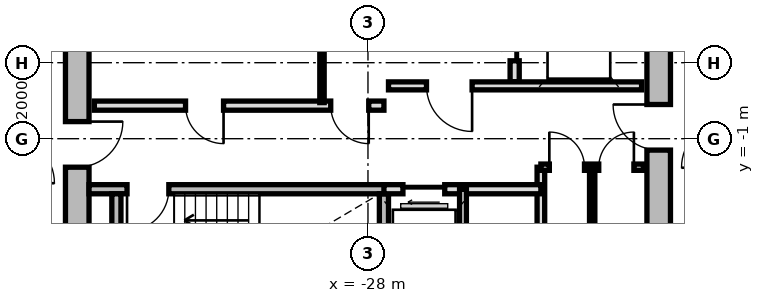
"""IFC4 building model, lengths in metres.
Left out: names, types, materials, properties, quantities, classifications, styles, units other than length and angle.
Written with IfcOpenShell. Run it as: python <this file> out.ifc"""

import sys

from ifc_helpers import new_model, si_unit, direction, frame, frame_2d, origin, place, context, subcontext, project, spatial, rectangle, extrude, source, transform, mapped, element, fill, save


model = new_model("IFC4")
c1 = context("Model", 3, precision=1e-05, world=origin(), true_north=direction((0.0, 1.0)))
c2 = subcontext(c1, "Body", "Model", "MODEL_VIEW")
j1 = project(units=[si_unit("LENGTHUNIT", "METRE"), si_unit("PLANEANGLEUNIT", "RADIAN")], contexts=[c1])
p1 = place(None, origin())
s1 = spatial("IfcSite", under=j1, at=p1, CompositionType="ELEMENT")
p2 = place(p1, origin())
s2 = spatial("IfcBuilding", under=s1, at=p2, CompositionType="ELEMENT")
p3 = place(p2, frame((0.0, 0.0, 146.5)))
s3 = spatial("IfcBuildingStorey", under=s2, at=p3, CompositionType="ELEMENT", Elevation=146.5)
m1 = source(origin(), c2, "Body", "SweptSolid", [
    extrude(rectangle(XDim=11.1, YDim=0.62, at=frame_2d((5.55, 0.0))), origin(), (0.0, 0.0, 1.0), 2.81),
])
p4 = place(p3, frame((-35.65, -5.55, 0.0), z_axis=(0.0, 0.0, 1.0), x_axis=(0.0, 1.0, 0.0)))
e1 = element("IfcWall", 1, at=p4, inside=s3, PredefinedType="SHEAR", context=c2, shape_type="MappedRepresentation", body=[
    mapped(m1, transform((0.0, 0.0, 0.0), x_axis=(1.0, 0.0, 0.0), y_axis=(0.0, 1.0, 0.0), z_axis=(0.0, 0.0, 1.0), scale=1.0)),
])
p5 = place(p4, frame((3.8, 0.0, 0.0)))
e2 = element("IfcOpeningElement", 2, at=p5, cuts=e1, PredefinedType="OPENING", context=c2, shape_type="SweptSolid", body=[
    extrude(rectangle(XDim=1.2, YDim=2.15, at=frame_2d((0.6, 1.075))), frame((0.0, 0.32, 0.0), z_axis=(0.0, -1.0, 0.0), x_axis=(1.0, 0.0, 0.0)), (0.0, 0.0, 1.0), 0.64),
])
p6 = place(p3, frame((-20.35, 5.55, 0.0), z_axis=(0.0, 0.0, 1.0), x_axis=(0.0, -1.0, 0.0)))
e3 = element("IfcWall", 3, at=p6, inside=s3, PredefinedType="SHEAR", context=c2, shape_type="MappedRepresentation", body=[
    mapped(m1, transform((0.0, 0.0, 0.0), x_axis=(1.0, 0.0, 0.0), y_axis=(0.0, 1.0, 0.0), z_axis=(0.0, 0.0, 1.0), scale=1.0)),
])
p7 = place(p6, frame((5.65, 0.0, 0.0)))
e4 = element("IfcOpeningElement", 4, at=p7, cuts=e3, PredefinedType="OPENING", context=c2, shape_type="SweptSolid", body=[
    extrude(rectangle(XDim=1.2, YDim=2.15, at=frame_2d((0.6, 1.075))), frame((0.0, 0.32, 0.0), z_axis=(0.0, -1.0, 0.0), x_axis=(1.0, 0.0, 0.0)), (0.0, 0.0, 1.0), 0.64),
])
m2 = source(origin(), c2, "Body", "SweptSolid", [
    extrude(rectangle(XDim=7.88, YDim=0.24, at=frame_2d((3.94, 0.0))), origin(), (0.0, 0.0, 1.0), 2.81),
])
p8 = place(p3, frame((-35.34, -2.33, 0.0), z_axis=(0.0, 0.0, 1.0), x_axis=(1.0, 0.0, 0.0)))
e5 = element("IfcWall", 5, at=p8, inside=s3, PredefinedType="PARTITIONING", context=c2, shape_type="MappedRepresentation", body=[
    mapped(m2, transform((0.0, 0.0, 0.0), x_axis=(1.0, 0.0, 0.0), y_axis=(0.0, 1.0, 0.0), z_axis=(0.0, 0.0, 1.0), scale=1.0)),
])
p9 = place(p8, frame((1.0, 0.0, 0.0)))
e6 = element("IfcOpeningElement", 6, at=p9, cuts=e5, PredefinedType="OPENING", context=c2, shape_type="SweptSolid", body=[
    extrude(rectangle(XDim=1.1, YDim=2.15, at=frame_2d((0.55, 1.075))), frame((0.0, 0.13, 0.0), z_axis=(0.0, -1.0, 0.0), x_axis=(1.0, 0.0, 0.0)), (0.0, 0.0, 1.0), 0.26),
])
m3 = source(origin(), c2, "Body", "SweptSolid", [
    extrude(rectangle(XDim=3.19, YDim=0.24, at=frame_2d((1.595, 0.0))), origin(), (0.0, 0.0, 1.0), 2.81),
])
for number, where, z_axis, x_axis in (
    (7, (-34.62, -5.64, 0.0), (0.0, 0.0, 1.0), (0.0, 1.0, 0.0)),
    (8, (-27.58, -5.64, 0.0), (0.0, 0.0, 1.0), (0.0, 1.0, 0.0)),
):
    element("IfcWall", number, at=place(p3, frame(where, z_axis=z_axis, x_axis=x_axis)), inside=s3, PredefinedType="PARTITIONING", context=c2, shape_type="MappedRepresentation", body=[
        mapped(m3, transform((0.0, 0.0, 0.0), x_axis=(1.0, 0.0, 0.0), y_axis=(0.0, 1.0, 0.0), z_axis=(0.0, 0.0, 1.0), scale=1.0)),
    ])
m4 = source(origin(), c2, "Body", "SweptSolid", [
    extrude(rectangle(XDim=5.0, YDim=0.24, at=frame_2d((2.5, 0.0))), origin(), (0.0, 0.0, 1.0), 2.795),
])
p10 = place(p3, frame((-24.14, 0.5, 0.0), z_axis=(0.0, 0.0, 1.0), x_axis=(0.0, 1.0, 0.0)))
e9 = element("IfcWall", 9, at=p10, inside=s3, PredefinedType="PARTITIONING", context=c2, shape_type="MappedRepresentation", body=[
    mapped(m4, transform((0.0, 0.0, 0.0), x_axis=(1.0, 0.0, 0.0), y_axis=(0.0, 1.0, 0.0), z_axis=(0.0, 0.0, 1.0), scale=1.0)),
])
p11 = place(p10, frame((3.05, 0.0, 0.0)))
e10 = element("IfcOpeningElement", 10, at=p11, cuts=e9, PredefinedType="OPENING", context=c2, shape_type="SweptSolid", body=[
    extrude(rectangle(XDim=1.3, YDim=2.2, at=frame_2d((0.65, 1.1))), frame((0.0, 0.13, 0.0), z_axis=(0.0, -1.0, 0.0), x_axis=(1.0, 0.0, 0.0)), (0.0, 0.0, 1.0), 0.26),
])
p12 = place(p10, frame((0.55, 0.0, 0.0)))
e11 = element("IfcOpeningElement", 11, at=p12, cuts=e9, PredefinedType="OPENING", context=c2, shape_type="SweptSolid", body=[
    extrude(rectangle(XDim=1.3, YDim=2.2, at=frame_2d((0.65, 1.1))), frame((0.0, 0.13, 0.0), z_axis=(0.0, -1.0, 0.0), x_axis=(1.0, 0.0, 0.0)), (0.0, 0.0, 1.0), 0.26),
])
m5 = source(origin(), c2, "Body", "SweptSolid", [
    extrude(rectangle(XDim=6.66, YDim=0.21, at=frame_2d((3.33, 0.0))), origin(), (0.0, 0.0, 1.0), 2.795),
])
p13 = place(p3, frame((-27.46, 0.39, 0.0), z_axis=(0.0, 0.0, 1.0), x_axis=(1.0, 0.0, 0.0)))
e12 = element("IfcWall", 12, at=p13, inside=s3, PredefinedType="PARTITIONING", context=c2, shape_type="MappedRepresentation", body=[
    mapped(m5, transform((0.0, 0.0, 0.0), x_axis=(1.0, 0.0, 0.0), y_axis=(0.0, 1.0, 0.0), z_axis=(0.0, 0.0, 1.0), scale=1.0)),
])
p14 = place(p13, frame((1.0, 0.0, 0.0)))
e13 = element("IfcOpeningElement", 13, at=p14, cuts=e12, PredefinedType="OPENING", context=c2, shape_type="SweptSolid", body=[
    extrude(rectangle(XDim=1.2, YDim=2.15, at=frame_2d((0.6, 1.075))), frame((0.0, 0.115, 0.0), z_axis=(0.0, -1.0, 0.0), x_axis=(1.0, 0.0, 0.0)), (0.0, 0.0, 1.0), 0.23),
])
m6 = source(origin(), c2, "Body", "SweptSolid", [
    extrude(rectangle(XDim=7.62, YDim=0.24, at=frame_2d((3.81, 0.0))), origin(), (0.0, 0.0, 1.0), 2.795),
])
p15 = place(p3, frame((-35.2, -0.13, 0.0), z_axis=(0.0, 0.0, 1.0), x_axis=(1.0, 0.0, 0.0)))
e14 = element("IfcWall", 14, at=p15, inside=s3, PredefinedType="PARTITIONING", context=c2, shape_type="MappedRepresentation", body=[
    mapped(m6, transform((0.0, 0.0, 0.0), x_axis=(1.0, 0.0, 0.0), y_axis=(0.0, 1.0, 0.0), z_axis=(0.0, 0.0, 1.0), scale=1.0)),
])
p16 = place(p15, frame((6.22, 0.0, 0.0)))
e15 = element("IfcOpeningElement", 15, at=p16, cuts=e14, PredefinedType="OPENING", context=c2, shape_type="SweptSolid", body=[
    extrude(rectangle(XDim=1.0, YDim=2.1, at=frame_2d((0.5, 1.05))), frame((0.0, 0.13, 0.0), z_axis=(0.0, -1.0, 0.0), x_axis=(1.0, 0.0, 0.0)), (0.0, 0.0, 1.0), 0.26),
])
p17 = place(p15, frame((2.4, 0.0, 0.0)))
e16 = element("IfcOpeningElement", 16, at=p17, cuts=e14, PredefinedType="OPENING", context=c2, shape_type="SweptSolid", body=[
    extrude(rectangle(XDim=1.0, YDim=2.1, at=frame_2d((0.5, 1.05))), frame((0.0, 0.13, 0.0), z_axis=(0.0, -1.0, 0.0), x_axis=(1.0, 0.0, 0.0)), (0.0, 0.0, 1.0), 0.26),
])
m7 = source(origin(), c2, "Body", "SweptSolid", [
    extrude(rectangle(XDim=2.33, YDim=0.115, at=frame_2d((1.165, 0.0))), origin(), (0.0, 0.0, 1.0), 2.795),
])
p18 = place(p3, frame((-29.21, -0.05, 0.0), z_axis=(0.0, 0.0, 1.0), x_axis=(0.0, 1.0, 0.0)))
e17 = element("IfcWall", 17, at=p18, inside=s3, PredefinedType="PARTITIONING", context=c2, shape_type="MappedRepresentation", body=[
    mapped(m7, transform((0.0, 0.0, 0.0), x_axis=(1.0, 0.0, 0.0), y_axis=(0.0, 1.0, 0.0), z_axis=(0.0, 0.0, 1.0), scale=1.0)),
])
m8 = source(origin(), c2, "Body", "SweptSolid", [
    extrude(rectangle(XDim=3.8, YDim=0.2, at=frame_2d((1.9, 0.0))), origin(), (0.0, 0.0, 1.0), 2.795),
])
p19 = place(p3, frame((-23.45, -5.55, 0.0), z_axis=(0.0, 0.0, 1.0), x_axis=(0.0, 1.0, 0.0)))
e18 = element("IfcWall", 18, at=p19, inside=s3, PredefinedType="PARTITIONING", context=c2, shape_type="MappedRepresentation", body=[
    mapped(m8, transform((0.0, 0.0, 0.0), x_axis=(1.0, 0.0, 0.0), y_axis=(0.0, 1.0, 0.0), z_axis=(0.0, 0.0, 1.0), scale=1.0)),
])
m9 = source(origin(), c2, "Body", "SweptSolid", [
    extrude(rectangle(XDim=4.13, YDim=0.24, at=frame_2d((2.065, 0.0))), origin(), (0.0, 0.0, 1.0), 2.795),
])
p20 = place(p3, frame((-27.58, -2.33, 0.0), z_axis=(0.0, 0.0, 1.0), x_axis=(1.0, 0.0, 0.0)))
e19 = element("IfcWall", 19, at=p20, inside=s3, PredefinedType="PARTITIONING", context=c2, shape_type="MappedRepresentation", body=[
    mapped(m9, transform((0.0, 0.0, 0.0), x_axis=(1.0, 0.0, 0.0), y_axis=(0.0, 1.0, 0.0), z_axis=(0.0, 0.0, 1.0), scale=1.0)),
])
p21 = place(p20, frame((0.5, 0.0, 0.0)))
e20 = element("IfcOpeningElement", 20, at=p21, cuts=e19, PredefinedType="OPENING", context=c2, shape_type="SweptSolid", body=[
    extrude(rectangle(XDim=1.1, YDim=2.2, at=frame_2d((0.55, 1.1))), frame((0.0, 0.13, 0.0), z_axis=(0.0, -1.0, 0.0), x_axis=(1.0, 0.0, 0.0)), (0.0, 0.0, 1.0), 0.26),
])
m10 = source(origin(), c2, "Body", "SweptSolid", [
    extrude(rectangle(XDim=3.22, YDim=0.18, at=frame_2d((1.61, 0.0))), origin(), (0.0, 0.0, 1.0), 2.795),
])
p22 = place(p3, frame((-25.5, -5.55, 0.0), z_axis=(0.0, 0.0, 1.0), x_axis=(0.0, 1.0, 0.0)))
e21 = element("IfcWall", 21, at=p22, inside=s3, PredefinedType="PARTITIONING", context=c2, shape_type="MappedRepresentation", body=[
    mapped(m10, transform((0.0, 0.0, 0.0), x_axis=(1.0, 0.0, 0.0), y_axis=(0.0, 1.0, 0.0), z_axis=(0.0, 0.0, 1.0), scale=1.0)),
])
m11 = source(origin(), c2, "Body", "SweptSolid", [
    extrude(rectangle(XDim=2.7, YDim=0.165, at=frame_2d((1.35, 0.0))), origin(), (0.0, 0.0, 1.0), 2.795),
])
p23 = place(p3, frame((-23.45, -1.75, 0.0), z_axis=(0.0, 0.0, 1.0), x_axis=(1.0, 0.0, 0.0)))
e22 = element("IfcWall", 22, at=p23, inside=s3, PredefinedType="PARTITIONING", context=c2, shape_type="MappedRepresentation", body=[
    mapped(m11, transform((0.0, 0.0, 0.0), x_axis=(1.0, 0.0, 0.0), y_axis=(0.0, 1.0, 0.0), z_axis=(0.0, 0.0, 1.0), scale=1.0)),
])
p24 = place(p23, frame((0.222, 0.0, 0.0)))
e23 = element("IfcOpeningElement", 23, at=p24, cuts=e22, PredefinedType="OPENING", context=c2, shape_type="SweptSolid", body=[
    extrude(rectangle(XDim=0.925, YDim=2.1, at=frame_2d((0.462, 1.05))), frame((0.0, 0.093, 0.0), z_axis=(0.0, -1.0, 0.0), x_axis=(1.0, 0.0, 0.0)), (0.0, 0.0, 1.0), 0.185),
])
p25 = place(p23, frame((1.522, 0.0, 0.0)))
e24 = element("IfcOpeningElement", 24, at=p25, cuts=e22, PredefinedType="OPENING", context=c2, shape_type="SweptSolid", body=[
    extrude(rectangle(XDim=0.925, YDim=2.1, at=frame_2d((0.462, 1.05))), frame((0.0, 0.093, 0.0), z_axis=(0.0, -1.0, 0.0), x_axis=(1.0, 0.0, 0.0)), (0.0, 0.0, 1.0), 0.185),
])
m12 = source(origin(), c2, "Body", "SweptSolid", [
    extrude(rectangle(XDim=3.8, YDim=0.14, at=frame_2d((1.9, 0.0))), origin(), (0.0, 0.0, 1.0), 2.795),
])
p26 = place(p3, frame((-22.1, -5.55, 0.0), z_axis=(0.0, 0.0, 1.0), x_axis=(0.0, 1.0, 0.0)))
e25 = element("IfcWall", 25, at=p26, inside=s3, PredefinedType="PARTITIONING", context=c2, shape_type="MappedRepresentation", body=[
    mapped(m12, transform((0.0, 0.0, 0.0), x_axis=(1.0, 0.0, 0.0), y_axis=(0.0, 1.0, 0.0), z_axis=(0.0, 0.0, 1.0), scale=1.0)),
])
m13 = source(origin(), c2, "Body", "SweptSolid", [
    extrude(rectangle(XDim=1.1, YDim=2.15, at=frame_2d((0.55, 1.075))), frame((0.0, 0.025, 0.0), z_axis=(0.0, -1.0, 0.0), x_axis=(1.0, 0.0, 0.0)), (0.0, 0.0, 1.0), 0.05),
])
p27 = place(p9, frame((1.1, 0.0, 0.0), z_axis=(0.0, 0.0, 1.0), x_axis=(-1.0, 0.0, 0.0)))
e26 = element("IfcDoor", 26, at=p27, inside=s3, OperationType="SINGLE_SWING_RIGHT", PredefinedType="DOOR", context=c2, shape_type="MappedRepresentation", body=[
    mapped(m13, transform((0.0, 0.0, 0.0), x_axis=(1.0, 0.0, 0.0), y_axis=(0.0, 1.0, 0.0), z_axis=(0.0, 0.0, 1.0), scale=1.0)),
])
fill(e6, e26)
m14 = source(origin(), c2, "Body", "SweptSolid", [
    extrude(rectangle(XDim=1.3, YDim=2.2, at=frame_2d((0.65, 1.1))), frame((0.0, 0.025, 0.0), z_axis=(0.0, -1.0, 0.0), x_axis=(1.0, 0.0, 0.0)), (0.0, 0.0, 1.0), 0.05),
])
p28 = place(p12, origin())
e27 = element("IfcDoor", 27, at=p28, inside=s3, OperationType="SLIDING_TO_RIGHT", PredefinedType="DOOR", context=c2, shape_type="MappedRepresentation", body=[
    mapped(m14, transform((0.0, 0.0, 0.0), x_axis=(1.0, 0.0, 0.0), y_axis=(0.0, 1.0, 0.0), z_axis=(0.0, 0.0, 1.0), scale=1.0)),
])
fill(e11, e27)
m15 = source(origin(), c2, "Body", "SweptSolid", [
    extrude(rectangle(XDim=1.2, YDim=2.15, at=frame_2d((0.6, 1.075))), frame((0.0, 0.025, 0.0), z_axis=(0.0, -1.0, 0.0), x_axis=(1.0, 0.0, 0.0)), (0.0, 0.0, 1.0), 0.05),
])
p29 = place(p14, frame((1.2, 0.0, 0.0), z_axis=(0.0, 0.0, 1.0), x_axis=(-1.0, 0.0, 0.0)))
e28 = element("IfcDoor", 28, at=p29, inside=s3, OperationType="SINGLE_SWING_LEFT", PredefinedType="DOOR", context=c2, shape_type="MappedRepresentation", body=[
    mapped(m15, transform((0.0, 0.0, 0.0), x_axis=(1.0, 0.0, 0.0), y_axis=(0.0, 1.0, 0.0), z_axis=(0.0, 0.0, 1.0), scale=1.0)),
])
fill(e13, e28)
p30 = place(p5, frame((1.2, 0.0, 0.0), z_axis=(0.0, 0.0, 1.0), x_axis=(-1.0, 0.0, 0.0)))
e29 = element("IfcDoor", 29, at=p30, inside=s3, OperationType="SINGLE_SWING_LEFT", PredefinedType="DOOR", context=c2, shape_type="MappedRepresentation", body=[
    mapped(m15, transform((0.0, 0.0, 0.0), x_axis=(1.0, 0.0, 0.0), y_axis=(0.0, 1.0, 0.0), z_axis=(0.0, 0.0, 1.0), scale=1.0)),
])
fill(e2, e29)
p31 = place(p7, frame((1.2, 0.0, 0.0), z_axis=(0.0, 0.0, 1.0), x_axis=(-1.0, 0.0, 0.0)))
e30 = element("IfcDoor", 30, at=p31, inside=s3, OperationType="SINGLE_SWING_RIGHT", PredefinedType="DOOR", context=c2, shape_type="MappedRepresentation", body=[
    mapped(m15, transform((0.0, 0.0, 0.0), x_axis=(1.0, 0.0, 0.0), y_axis=(0.0, 1.0, 0.0), z_axis=(0.0, 0.0, 1.0), scale=1.0)),
])
fill(e4, e30)
m16 = source(origin(), c2, "Body", "SweptSolid", [
    extrude(rectangle(XDim=1.0, YDim=2.1, at=frame_2d((0.5, 1.05))), frame((0.0, 0.025, 0.0), z_axis=(0.0, -1.0, 0.0), x_axis=(1.0, 0.0, 0.0)), (0.0, 0.0, 1.0), 0.05),
])
p32 = place(p16, frame((1.0, 0.0, 0.0), z_axis=(0.0, 0.0, 1.0), x_axis=(-1.0, 0.0, 0.0)))
e31 = element("IfcDoor", 31, at=p32, inside=s3, OperationType="SINGLE_SWING_LEFT", PredefinedType="DOOR", context=c2, shape_type="MappedRepresentation", body=[
    mapped(m16, transform((0.0, 0.0, 0.0), x_axis=(1.0, 0.0, 0.0), y_axis=(0.0, 1.0, 0.0), z_axis=(0.0, 0.0, 1.0), scale=1.0)),
])
fill(e15, e31)
p33 = place(p17, frame((1.0, 0.0, 0.0), z_axis=(0.0, 0.0, 1.0), x_axis=(-1.0, 0.0, 0.0)))
e32 = element("IfcDoor", 32, at=p33, inside=s3, OperationType="SINGLE_SWING_LEFT", PredefinedType="DOOR", context=c2, shape_type="MappedRepresentation", body=[
    mapped(m16, transform((0.0, 0.0, 0.0), x_axis=(1.0, 0.0, 0.0), y_axis=(0.0, 1.0, 0.0), z_axis=(0.0, 0.0, 1.0), scale=1.0)),
])
fill(e16, e32)
m17 = source(origin(), c2, "Body", "SweptSolid", [
    extrude(rectangle(XDim=1.1, YDim=2.2, at=frame_2d((0.55, 1.1))), frame((0.0, 0.025, 0.0), z_axis=(0.0, -1.0, 0.0), x_axis=(1.0, 0.0, 0.0)), (0.0, 0.0, 1.0), 0.05),
])
p34 = place(p21, frame((1.1, 0.0, 0.0), z_axis=(0.0, 0.0, 1.0), x_axis=(-1.0, 0.0, 0.0)))
e33 = element("IfcDoor", 33, at=p34, inside=s3, OperationType="SLIDING_TO_LEFT", PredefinedType="DOOR", context=c2, shape_type="MappedRepresentation", body=[
    mapped(m17, transform((0.0, 0.0, 0.0), x_axis=(1.0, 0.0, 0.0), y_axis=(0.0, 1.0, 0.0), z_axis=(0.0, 0.0, 1.0), scale=1.0)),
])
fill(e20, e33)
m18 = source(origin(), c2, "Body", "SweptSolid", [
    extrude(rectangle(XDim=0.925, YDim=2.1, at=frame_2d((0.462, 1.05))), frame((0.0, 0.025, 0.0), z_axis=(0.0, -1.0, 0.0), x_axis=(1.0, 0.0, 0.0)), (0.0, 0.0, 1.0), 0.05),
])
p35 = place(p24, origin())
e34 = element("IfcDoor", 34, at=p35, inside=s3, OperationType="SINGLE_SWING_LEFT", PredefinedType="DOOR", context=c2, shape_type="MappedRepresentation", body=[
    mapped(m18, transform((0.0, 0.0, 0.0), x_axis=(1.0, 0.0, 0.0), y_axis=(0.0, 1.0, 0.0), z_axis=(0.0, 0.0, 1.0), scale=1.0)),
])
fill(e23, e34)
p36 = place(p25, origin())
e35 = element("IfcDoor", 35, at=p36, inside=s3, OperationType="SINGLE_SWING_RIGHT", PredefinedType="DOOR", context=c2, shape_type="MappedRepresentation", body=[
    mapped(m18, transform((0.0, 0.0, 0.0), x_axis=(1.0, 0.0, 0.0), y_axis=(0.0, 1.0, 0.0), z_axis=(0.0, 0.0, 1.0), scale=1.0)),
])
fill(e24, e35)
save(model, sys.argv[1])
